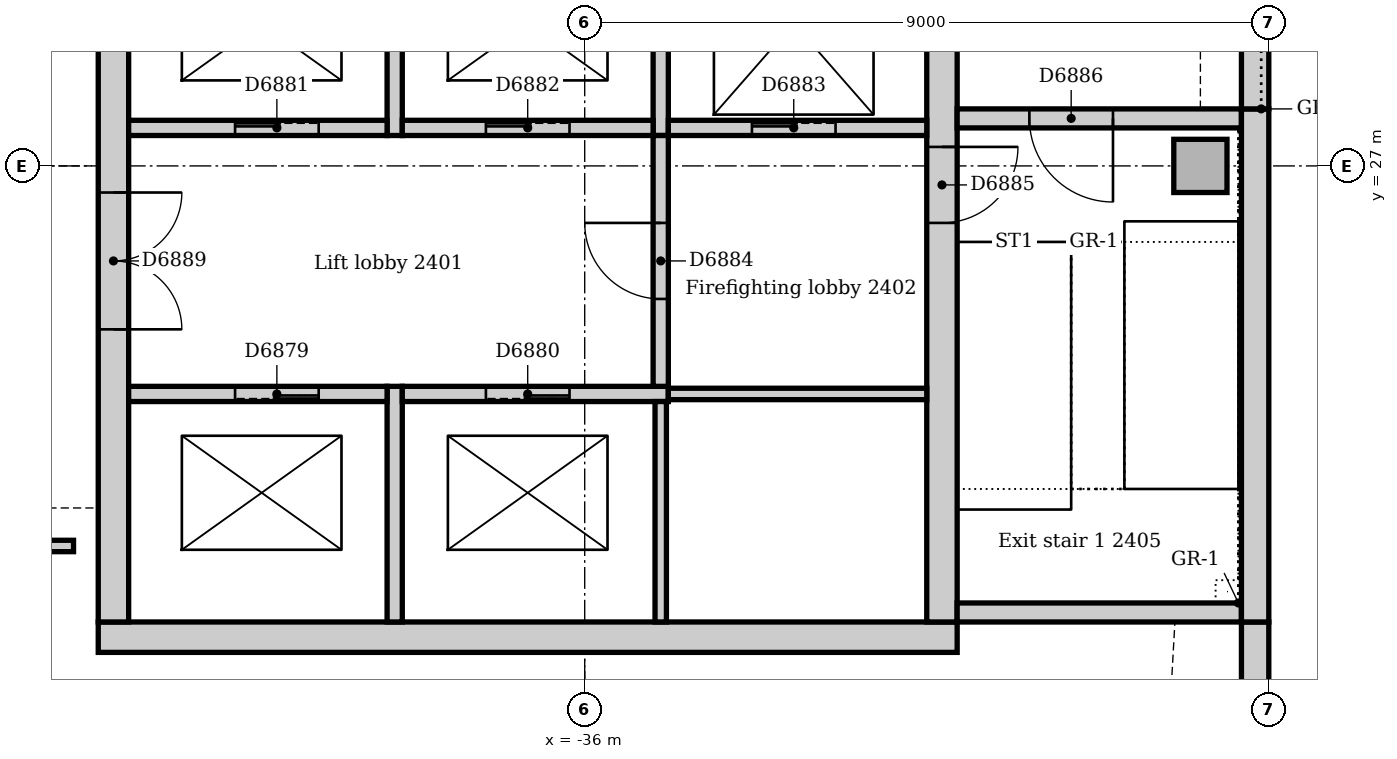
"""IFC4 building model, lengths in metres.
Left out: names, types, materials, properties, quantities, classifications, styles, units other than length and angle.
Written with IfcOpenShell. Run it as: python <this file> out.ifc"""

import sys

from ifc_helpers import new_model, si_unit, direction, frame, frame_2d, origin, origin_2d, place, context, subcontext, project, spatial, rectangle, extrude, element, fill, save


model = new_model("IFC4")
c1 = context("Model", 3, precision=1e-05, world=origin(), true_north=direction((0.0, 1.0)))
c2 = subcontext(c1, "Body", "Model", "MODEL_VIEW")
j1 = project(units=[si_unit("LENGTHUNIT", "METRE"), si_unit("PLANEANGLEUNIT", "RADIAN")], contexts=[c1])
p1 = place(None, origin())
s1 = spatial("IfcSite", under=j1, at=p1, CompositionType="ELEMENT")
p2 = place(p1, origin())
s2 = spatial("IfcBuilding", under=s1, at=p2, CompositionType="ELEMENT")
p3 = place(p2, frame((0.0, 0.0, 104.0)))
s3 = spatial("IfcBuildingStorey", under=s2, at=p3, CompositionType="ELEMENT", Elevation=104.0)
p4 = place(p3, frame((-42.4, 20.8, 0.0), z_axis=(0.0, 0.0, 1.0), x_axis=(1.0, 0.0, 0.0)))
e1 = element("IfcWall", 1, at=p4, inside=s3, PredefinedType="SOLIDWALL", context=c2, shape_type="SweptSolid", body=[
    extrude(rectangle(XDim=11.3, YDim=0.4, at=frame_2d((5.65, 0.0))), origin(), (0.0, 0.0, 1.0), 4.0),
])
p5 = place(p3, frame((-31.3, 21.0, 0.0), z_axis=(0.0, 0.0, 1.0), x_axis=(0.0, 1.0, 0.0)))
e2 = element("IfcWall", 2, at=p5, inside=s3, PredefinedType="SOLIDWALL", context=c2, shape_type="SweptSolid", body=[
    extrude(rectangle(XDim=9.5, YDim=0.4, at=frame_2d((4.75, 0.0))), origin(), (0.0, 0.0, 1.0), 4.0),
])
p6 = place(p5, frame((5.25, 0.0, 0.0)))
e3 = element("IfcOpeningElement", 3, at=p6, cuts=e2, PredefinedType="OPENING", context=c2, shape_type="SweptSolid", body=[
    extrude(rectangle(XDim=1.0, YDim=2.1, at=frame_2d((0.5, 1.05))), frame((0.0, 0.21, 0.0), z_axis=(0.0, -1.0, 0.0), x_axis=(1.0, 0.0, 0.0)), (0.0, 0.0, 1.0), 0.42),
])
p7 = place(p3, frame((-42.2, 30.5, 0.0), z_axis=(0.0, 0.0, 1.0), x_axis=(0.0, -1.0, 0.0)))
e4 = element("IfcWall", 4, at=p7, inside=s3, PredefinedType="SOLIDWALL", context=c2, shape_type="SweptSolid", body=[
    extrude(rectangle(XDim=9.5, YDim=0.4, at=frame_2d((4.75, 0.0))), origin(), (0.0, 0.0, 1.0), 4.0),
])
p8 = place(p7, frame((3.85, 0.0, 0.0)))
e5 = element("IfcOpeningElement", 5, at=p8, cuts=e4, PredefinedType="OPENING", context=c2, shape_type="SweptSolid", body=[
    extrude(rectangle(XDim=1.8, YDim=2.1, at=frame_2d((0.9, 1.05))), frame((0.0, 0.21, 0.0), z_axis=(0.0, -1.0, 0.0), x_axis=(1.0, 0.0, 0.0)), (0.0, 0.0, 1.0), 0.42),
])
p9 = place(p3, frame((-31.1, 21.125, 0.0), z_axis=(0.0, 0.0, 1.0), x_axis=(1.0, 0.0, 0.0)))
e6 = element("IfcWall", 6, at=p9, inside=s3, PredefinedType="SOLIDWALL", context=c2, shape_type="SweptSolid", body=[
    extrude(rectangle(XDim=3.74, YDim=0.25, at=frame_2d((1.87, 0.0))), origin(), (0.0, 0.0, 1.0), 4.0),
])
p10 = place(p3, frame((-27.36, 27.625, 0.0), z_axis=(0.0, 0.0, 1.0), x_axis=(-1.0, 0.0, 0.0)))
e7 = element("IfcWall", 7, at=p10, inside=s3, PredefinedType="SOLIDWALL", context=c2, shape_type="SweptSolid", body=[
    extrude(rectangle(XDim=3.74, YDim=0.25, at=frame_2d((1.87, 0.0))), origin(), (0.0, 0.0, 1.0), 4.0),
])
p11 = place(p10, frame((1.69, 0.0, 0.0)))
e8 = element("IfcOpeningElement", 8, at=p11, cuts=e7, PredefinedType="OPENING", context=c2, shape_type="SweptSolid", body=[
    extrude(rectangle(XDim=1.1, YDim=2.1, at=frame_2d((0.55, 1.05))), frame((0.0, 0.135, 0.0), z_axis=(0.0, -1.0, 0.0), x_axis=(1.0, 0.0, 0.0)), (0.0, 0.0, 1.0), 0.27),
])
p12 = place(p3, frame((-27.9, 27.0, 0.0), z_axis=(0.0, 0.0, 1.0), x_axis=(1.0, 0.0, 0.0)))
e9 = element("IfcColumn", 9, at=p12, inside=s3, PredefinedType="COLUMN", context=c2, shape_type="SweptSolid", body=[
    extrude(rectangle(XDim=0.7, YDim=0.7, at=origin_2d()), origin(), (0.0, 0.0, 1.0), 4.0),
])
p13 = place(p3, frame((-27.18, 17.743, 0.0), z_axis=(0.0, 0.0, 1.0), x_axis=(0.0, 1.0, 0.0)))
e10 = element("IfcWall", 10, at=p13, inside=s3, PredefinedType="STANDARD", context=c2, shape_type="SweptSolid", body=[
    extrude(rectangle(XDim=3.257, YDim=0.36, at=frame_2d((1.629, 0.0))), origin(), (0.0, 0.0, 1.0), 3.85),
])
p14 = place(p3, frame((-27.18, 21.0, 0.0), z_axis=(0.0, 0.0, 1.0), x_axis=(0.0, 1.0, 0.0)))
e11 = element("IfcWall", 11, at=p14, inside=s3, PredefinedType="STANDARD", context=c2, shape_type="SweptSolid", body=[
    extrude(rectangle(XDim=6.75, YDim=0.36, at=frame_2d((3.375, 0.0))), origin(), (0.0, 0.0, 1.0), 3.85),
])
p15 = place(p3, frame((-27.18, 27.75, 0.0), z_axis=(0.0, 0.0, 1.0), x_axis=(0.0, 1.0, 0.0)))
e12 = element("IfcWall", 12, at=p15, inside=s3, PredefinedType="STANDARD", context=c2, shape_type="SweptSolid", body=[
    extrude(rectangle(XDim=7.5, YDim=0.36, at=frame_2d((3.75, 0.0))), origin(), (0.0, 0.0, 1.0), 3.85),
])
p16 = place(p15, frame((2.85, 0.0, 1.2)))
e13 = element("IfcOpeningElement", 13, at=p16, cuts=e12, PredefinedType="OPENING", context=c2, shape_type="SweptSolid", body=[
    extrude(rectangle(XDim=1.8, YDim=1.2, at=frame_2d((0.9, 0.6))), frame((0.0, 0.19, 0.0), z_axis=(0.0, -1.0, 0.0), x_axis=(1.0, 0.0, 0.0)), (0.0, 0.0, 1.0), 0.38),
])
p17 = place(p3, frame((-38.5, 21.0, 0.0), z_axis=(0.0, 0.0, 1.0), x_axis=(0.0, 1.0, 0.0)))
e14 = element("IfcWall", 14, at=p17, inside=s3, PredefinedType="SOLIDWALL", context=c2, shape_type="SweptSolid", body=[
    extrude(rectangle(XDim=3.1, YDim=0.2, at=frame_2d((1.55, 0.0))), origin(), (0.0, 0.0, 1.0), 4.0),
])
p18 = place(p3, frame((-38.6, 24.0, 0.0), z_axis=(0.0, 0.0, 1.0), x_axis=(-1.0, 0.0, 0.0)))
e15 = element("IfcWall", 15, at=p18, inside=s3, PredefinedType="SOLIDWALL", context=c2, shape_type="SweptSolid", body=[
    extrude(rectangle(XDim=3.4, YDim=0.2, at=frame_2d((1.7, 0.0))), origin(), (0.0, 0.0, 1.0), 4.0),
])
p19 = place(p18, frame((0.9, 0.0, 0.0)))
e16 = element("IfcOpeningElement", 16, at=p19, cuts=e15, PredefinedType="OPENING", context=c2, shape_type="SweptSolid", body=[
    extrude(rectangle(XDim=1.1, YDim=2.1, at=frame_2d((0.55, 1.05))), frame((0.0, 0.11, 0.0), z_axis=(0.0, -1.0, 0.0), x_axis=(1.0, 0.0, 0.0)), (0.0, 0.0, 1.0), 0.22),
])
p20 = place(p3, frame((-34.9, 24.0, 0.0), z_axis=(0.0, 0.0, 1.0), x_axis=(-1.0, 0.0, 0.0)))
e17 = element("IfcWall", 17, at=p20, inside=s3, PredefinedType="SOLIDWALL", context=c2, shape_type="SweptSolid", body=[
    extrude(rectangle(XDim=3.5, YDim=0.2, at=frame_2d((1.75, 0.0))), origin(), (0.0, 0.0, 1.0), 4.0),
])
p21 = place(p20, frame((1.3, 0.0, 0.0)))
e18 = element("IfcOpeningElement", 18, at=p21, cuts=e17, PredefinedType="OPENING", context=c2, shape_type="SweptSolid", body=[
    extrude(rectangle(XDim=1.1, YDim=2.1, at=frame_2d((0.55, 1.05))), frame((0.0, 0.11, 0.0), z_axis=(0.0, -1.0, 0.0), x_axis=(1.0, 0.0, 0.0)), (0.0, 0.0, 1.0), 0.22),
])
p22 = place(p3, frame((-38.5, 27.4, 0.0), z_axis=(0.0, 0.0, 1.0), x_axis=(0.0, 1.0, 0.0)))
e19 = element("IfcWall", 19, at=p22, inside=s3, PredefinedType="SOLIDWALL", context=c2, shape_type="SweptSolid", body=[
    extrude(rectangle(XDim=2.85, YDim=0.2, at=frame_2d((1.425, 0.0))), origin(), (0.0, 0.0, 1.0), 4.0),
])
p23 = place(p3, frame((-42.0, 27.5, 0.0), z_axis=(0.0, 0.0, 1.0), x_axis=(1.0, 0.0, 0.0)))
e20 = element("IfcWall", 20, at=p23, inside=s3, PredefinedType="SOLIDWALL", context=c2, shape_type="SweptSolid", body=[
    extrude(rectangle(XDim=3.4, YDim=0.2, at=frame_2d((1.7, 0.0))), origin(), (0.0, 0.0, 1.0), 4.0),
])
p24 = place(p23, frame((1.4, 0.0, 0.0)))
e21 = element("IfcOpeningElement", 21, at=p24, cuts=e20, PredefinedType="OPENING", context=c2, shape_type="SweptSolid", body=[
    extrude(rectangle(XDim=1.1, YDim=2.1, at=frame_2d((0.55, 1.05))), frame((0.0, 0.11, 0.0), z_axis=(0.0, -1.0, 0.0), x_axis=(1.0, 0.0, 0.0)), (0.0, 0.0, 1.0), 0.22),
])
p25 = place(p3, frame((-35.0, 27.4, 0.0), z_axis=(0.0, 0.0, 1.0), x_axis=(0.0, 1.0, 0.0)))
e22 = element("IfcWall", 22, at=p25, inside=s3, PredefinedType="SOLIDWALL", context=c2, shape_type="SweptSolid", body=[
    extrude(rectangle(XDim=2.85, YDim=0.2, at=frame_2d((1.425, 0.0))), origin(), (0.0, 0.0, 1.0), 4.0),
])
p26 = place(p3, frame((-38.4, 27.5, 0.0), z_axis=(0.0, 0.0, 1.0), x_axis=(1.0, 0.0, 0.0)))
e23 = element("IfcWall", 23, at=p26, inside=s3, PredefinedType="SOLIDWALL", context=c2, shape_type="SweptSolid", body=[
    extrude(rectangle(XDim=3.3, YDim=0.2, at=frame_2d((1.65, 0.0))), origin(), (0.0, 0.0, 1.0), 4.0),
])
p27 = place(p26, frame((1.1, 0.0, 0.0)))
e24 = element("IfcOpeningElement", 24, at=p27, cuts=e23, PredefinedType="OPENING", context=c2, shape_type="SweptSolid", body=[
    extrude(rectangle(XDim=1.1, YDim=2.1, at=frame_2d((0.55, 1.05))), frame((0.0, 0.11, 0.0), z_axis=(0.0, -1.0, 0.0), x_axis=(1.0, 0.0, 0.0)), (0.0, 0.0, 1.0), 0.22),
])
p28 = place(p3, frame((-34.9, 27.5, 0.0), z_axis=(0.0, 0.0, 1.0), x_axis=(1.0, 0.0, 0.0)))
e25 = element("IfcWall", 25, at=p28, inside=s3, PredefinedType="SOLIDWALL", context=c2, shape_type="SweptSolid", body=[
    extrude(rectangle(XDim=3.4, YDim=0.2, at=frame_2d((1.7, 0.0))), origin(), (0.0, 0.0, 1.0), 4.0),
])
p29 = place(p28, frame((1.1, 0.0, 0.0)))
e26 = element("IfcOpeningElement", 26, at=p29, cuts=e25, PredefinedType="OPENING", context=c2, shape_type="SweptSolid", body=[
    extrude(rectangle(XDim=1.1, YDim=2.1, at=frame_2d((0.55, 1.05))), frame((0.0, 0.11, 0.0), z_axis=(0.0, -1.0, 0.0), x_axis=(1.0, 0.0, 0.0)), (0.0, 0.0, 1.0), 0.22),
])
p30 = place(p3, frame((-35.0, 24.1, 0.0), z_axis=(0.0, 0.0, 1.0), x_axis=(0.0, 1.0, 0.0)))
e27 = element("IfcWall", 27, at=p30, inside=s3, PredefinedType="SOLIDWALL", context=c2, shape_type="SweptSolid", body=[
    extrude(rectangle(XDim=3.3, YDim=0.2, at=frame_2d((1.65, 0.0))), origin(), (0.0, 0.0, 1.0), 4.0),
])
p31 = place(p30, frame((1.15, 0.0, 0.0)))
e28 = element("IfcOpeningElement", 28, at=p31, cuts=e27, PredefinedType="OPENING", context=c2, shape_type="SweptSolid", body=[
    extrude(rectangle(XDim=1.0, YDim=2.1, at=frame_2d((0.5, 1.05))), frame((0.0, 0.11, 0.0), z_axis=(0.0, -1.0, 0.0), x_axis=(1.0, 0.0, 0.0)), (0.0, 0.0, 1.0), 0.22),
])
p32 = place(p3, frame((-35.0, 21.0, 0.0), z_axis=(0.0, 0.0, 1.0), x_axis=(0.0, 1.0, 0.0)))
e29 = element("IfcWall", 29, at=p32, inside=s3, PredefinedType="SOLIDWALL", context=c2, shape_type="SweptSolid", body=[
    extrude(rectangle(XDim=2.9, YDim=0.15, at=frame_2d((1.45, 0.0))), origin(), (0.0, 0.0, 1.0), 4.0),
])
p33 = place(p3, frame((-31.5, 24.0, 0.0), z_axis=(0.0, 0.0, 1.0), x_axis=(-1.0, 0.0, 0.0)))
e30 = element("IfcWall", 30, at=p33, inside=s3, PredefinedType="SOLIDWALL", context=c2, shape_type="SweptSolid", body=[
    extrude(rectangle(XDim=3.4, YDim=0.15, at=frame_2d((1.7, 0.0))), origin(), (0.0, 0.0, 1.0), 4.0),
])
p34 = place(p3, frame((-59.766, 22.0, 0.0), z_axis=(0.0, 0.0, 1.0), x_axis=(1.0, 0.0, 0.0)))
e31 = element("IfcWall", 31, at=p34, inside=s3, PredefinedType="PARTITIONING", context=c2, shape_type="SweptSolid", body=[
    extrude(rectangle(XDim=17.041, YDim=0.15, at=frame_2d((8.52, 0.0))), origin(), (0.0, 0.0, 1.0), 3.85),
])
p35 = place(p34, frame((15.366, 0.0, 0.0)))
e32 = element("IfcOpeningElement", 32, at=p35, cuts=e31, PredefinedType="OPENING", context=c2, shape_type="SweptSolid", body=[
    extrude(rectangle(XDim=0.9, YDim=2.1, at=frame_2d((0.45, 1.05))), frame((0.0, 0.085, 0.0), z_axis=(0.0, -1.0, 0.0), x_axis=(1.0, 0.0, 0.0)), (0.0, 0.0, 1.0), 0.17),
])
p36 = place(p34, frame((2.5, 0.0, 0.0)))
e33 = element("IfcOpeningElement", 33, at=p36, cuts=e31, PredefinedType="OPENING", context=c2, shape_type="SweptSolid", body=[
    extrude(rectangle(XDim=0.9, YDim=2.1, at=frame_2d((0.45, 1.05))), frame((0.0, 0.085, 0.0), z_axis=(0.0, -1.0, 0.0), x_axis=(1.0, 0.0, 0.0)), (0.0, 0.0, 1.0), 0.17),
])
p37 = place(p34, frame((9.056, 0.0, 0.0)))
e34 = element("IfcOpeningElement", 34, at=p37, cuts=e31, PredefinedType="OPENING", context=c2, shape_type="SweptSolid", body=[
    extrude(rectangle(XDim=1.0, YDim=2.1, at=frame_2d((0.5, 1.05))), frame((0.0, 0.085, 0.0), z_axis=(0.0, -1.0, 0.0), x_axis=(1.0, 0.0, 0.0)), (0.0, 0.0, 1.0), 0.17),
])
p38 = place(p19, origin())
e35 = element("IfcDoor", 35, at=p38, inside=s3, OperationType="SLIDING_TO_LEFT", PredefinedType="DOOR", context=c2, shape_type="SweptSolid", body=[
    extrude(rectangle(XDim=1.1, YDim=2.1, at=frame_2d((0.55, 1.05))), frame((0.0, 0.025, 0.0), z_axis=(0.0, -1.0, 0.0), x_axis=(1.0, 0.0, 0.0)), (0.0, 0.0, 1.0), 0.05),
])
fill(e16, e35)
p39 = place(p21, origin())
e36 = element("IfcDoor", 36, at=p39, inside=s3, OperationType="SLIDING_TO_LEFT", PredefinedType="DOOR", context=c2, shape_type="SweptSolid", body=[
    extrude(rectangle(XDim=1.1, YDim=2.1, at=frame_2d((0.55, 1.05))), frame((0.0, 0.025, 0.0), z_axis=(0.0, -1.0, 0.0), x_axis=(1.0, 0.0, 0.0)), (0.0, 0.0, 1.0), 0.05),
])
fill(e18, e36)
p40 = place(p24, origin())
e37 = element("IfcDoor", 37, at=p40, inside=s3, OperationType="SLIDING_TO_LEFT", PredefinedType="DOOR", context=c2, shape_type="SweptSolid", body=[
    extrude(rectangle(XDim=1.1, YDim=2.1, at=frame_2d((0.55, 1.05))), frame((0.0, 0.025, 0.0), z_axis=(0.0, -1.0, 0.0), x_axis=(1.0, 0.0, 0.0)), (0.0, 0.0, 1.0), 0.05),
])
fill(e21, e37)
p41 = place(p27, origin())
e38 = element("IfcDoor", 38, at=p41, inside=s3, OperationType="SLIDING_TO_LEFT", PredefinedType="DOOR", context=c2, shape_type="SweptSolid", body=[
    extrude(rectangle(XDim=1.1, YDim=2.1, at=frame_2d((0.55, 1.05))), frame((0.0, 0.025, 0.0), z_axis=(0.0, -1.0, 0.0), x_axis=(1.0, 0.0, 0.0)), (0.0, 0.0, 1.0), 0.05),
])
fill(e24, e38)
p42 = place(p29, origin())
e39 = element("IfcDoor", 39, at=p42, inside=s3, OperationType="SLIDING_TO_LEFT", PredefinedType="DOOR", context=c2, shape_type="SweptSolid", body=[
    extrude(rectangle(XDim=1.1, YDim=2.1, at=frame_2d((0.55, 1.05))), frame((0.0, 0.025, 0.0), z_axis=(0.0, -1.0, 0.0), x_axis=(1.0, 0.0, 0.0)), (0.0, 0.0, 1.0), 0.05),
])
fill(e26, e39)
p43 = place(p31, origin())
e40 = element("IfcDoor", 40, at=p43, inside=s3, OperationType="SINGLE_SWING_RIGHT", PredefinedType="DOOR", context=c2, shape_type="SweptSolid", body=[
    extrude(rectangle(XDim=1.0, YDim=2.1, at=frame_2d((0.5, 1.05))), frame((0.0, 0.025, 0.0), z_axis=(0.0, -1.0, 0.0), x_axis=(1.0, 0.0, 0.0)), (0.0, 0.0, 1.0), 0.05),
])
fill(e28, e40)
p44 = place(p6, frame((1.0, 0.0, 0.0), z_axis=(0.0, 0.0, 1.0), x_axis=(-1.0, 0.0, 0.0)))
e41 = element("IfcDoor", 41, at=p44, inside=s3, OperationType="SINGLE_SWING_LEFT", PredefinedType="DOOR", context=c2, shape_type="SweptSolid", body=[
    extrude(rectangle(XDim=1.0, YDim=2.1, at=frame_2d((0.5, 1.05))), frame((0.0, 0.025, 0.0), z_axis=(0.0, -1.0, 0.0), x_axis=(1.0, 0.0, 0.0)), (0.0, 0.0, 1.0), 0.05),
])
fill(e3, e41)
p45 = place(p11, origin())
e42 = element("IfcDoor", 42, at=p45, inside=s3, OperationType="SINGLE_SWING_LEFT", PredefinedType="DOOR", context=c2, shape_type="SweptSolid", body=[
    extrude(rectangle(XDim=1.1, YDim=2.1, at=frame_2d((0.55, 1.05))), frame((0.0, 0.025, 0.0), z_axis=(0.0, -1.0, 0.0), x_axis=(1.0, 0.0, 0.0)), (0.0, 0.0, 1.0), 0.05),
])
fill(e8, e42)
p46 = place(p8, origin())
e43 = element("IfcDoor", 43, at=p46, inside=s3, OperationType="DOUBLE_DOOR_SINGLE_SWING", PredefinedType="DOOR", context=c2, shape_type="SweptSolid", body=[
    extrude(rectangle(XDim=1.8, YDim=2.1, at=frame_2d((0.9, 1.05))), frame((0.0, 0.025, 0.0), z_axis=(0.0, -1.0, 0.0), x_axis=(1.0, 0.0, 0.0)), (0.0, 0.0, 1.0), 0.05),
])
fill(e5, e43)
save(model, sys.argv[1])
